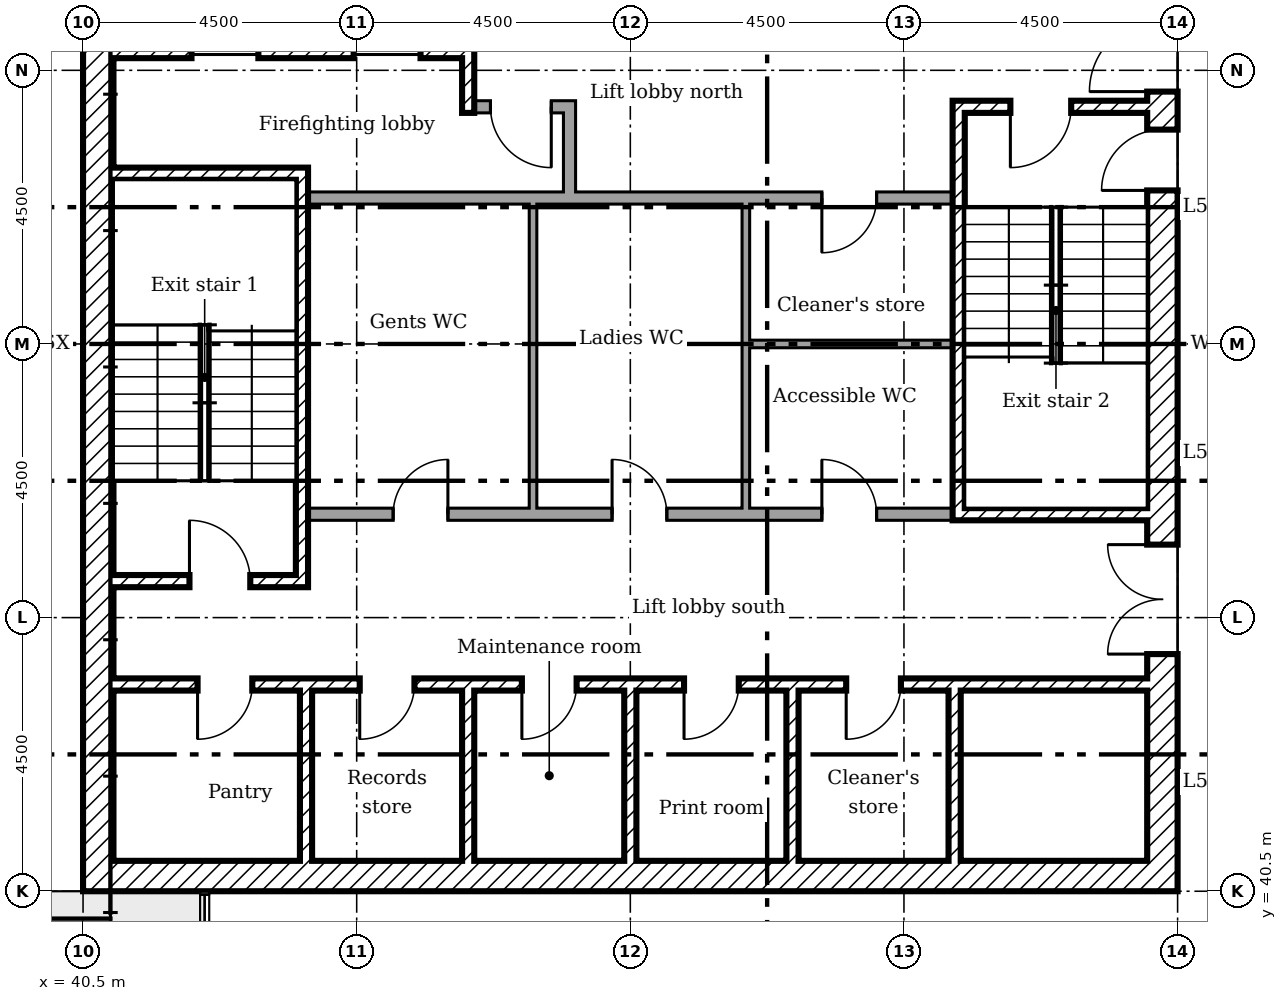
"""IFC4 building model, lengths in metres.
Left out: names, types, materials, properties, quantities, classifications, styles, units other than length and angle.
Written with IfcOpenShell. Run it as: python <this file> out.ifc"""

import sys

from ifc_helpers import new_model, si_unit, direction, frame, frame_2d, origin, place, context, subcontext, project, spatial, rectangle, extrude, element, fill, save


model = new_model("IFC4")
c1 = context("Model", 3, precision=1e-05, world=origin(), true_north=direction((0.0, 1.0)))
c2 = subcontext(c1, "Body", "Model", "MODEL_VIEW")
j1 = project(units=[si_unit("LENGTHUNIT", "METRE"), si_unit("PLANEANGLEUNIT", "RADIAN")], contexts=[c1])
p1 = place(None, origin())
s1 = spatial("IfcSite", under=j1, at=p1, CompositionType="ELEMENT")
p2 = place(p1, origin())
s2 = spatial("IfcBuilding", under=s1, at=p2, CompositionType="ELEMENT")
p3 = place(p2, frame((0.0, 0.0, 206.4)))
s3 = spatial("IfcBuildingStorey", under=s2, at=p3, CompositionType="ELEMENT", Elevation=206.4)
p4 = place(p3, frame((58.25, 40.5, 0.0), z_axis=(0.0, 0.0, 1.0), x_axis=(0.0, 1.0, 0.0)))
e1 = element("IfcWall", 1, at=p4, inside=s3, PredefinedType="SHEAR", context=c2, shape_type="SweptSolid", body=[
    extrude(rectangle(XDim=18.0, YDim=0.5, at=frame_2d((9.0, 0.0))), origin(), (0.0, 0.0, 1.0), 3.35),
])
p5 = place(p4, frame((13.15, 0.0, 0.0)))
e2 = element("IfcOpeningElement", 2, at=p5, cuts=e1, PredefinedType="OPENING", context=c2, shape_type="SweptSolid", body=[
    extrude(rectangle(XDim=1.2, YDim=2.1, at=frame_2d((0.6, 1.05))), frame((0.0, 0.26, 0.0), z_axis=(0.0, -1.0, 0.0), x_axis=(1.0, 0.0, 0.0)), (0.0, 0.0, 1.0), 0.52),
])
p6 = place(p4, frame((3.9, 0.0, 0.0)))
e3 = element("IfcOpeningElement", 3, at=p6, cuts=e1, PredefinedType="OPENING", context=c2, shape_type="SweptSolid", body=[
    extrude(rectangle(XDim=1.8, YDim=2.1, at=frame_2d((0.9, 1.05))), frame((0.0, 0.26, 0.0), z_axis=(0.0, -1.0, 0.0), x_axis=(1.0, 0.0, 0.0)), (0.0, 0.0, 1.0), 0.52),
])
p7 = place(p4, frame((11.525, 0.0, 0.0)))
e4 = element("IfcOpeningElement", 4, at=p7, cuts=e1, PredefinedType="OPENING", context=c2, shape_type="SweptSolid", body=[
    extrude(rectangle(XDim=1.0, YDim=2.1, at=frame_2d((0.5, 1.05))), frame((0.0, 0.26, 0.0), z_axis=(0.0, -1.0, 0.0), x_axis=(1.0, 0.0, 0.0)), (0.0, 0.0, 1.0), 0.52),
])
p8 = place(p3, frame((40.5, 40.75, 0.0)))
e5 = element("IfcWall", 5, at=p8, inside=s3, PredefinedType="SHEAR", context=c2, shape_type="SweptSolid", body=[
    extrude(rectangle(XDim=17.5, YDim=0.5, at=frame_2d((8.75, 0.0))), origin(), (0.0, 0.0, 1.0), 3.35),
])
p9 = place(p3, frame((40.75, 41.0, 0.0), z_axis=(0.0, 0.0, 1.0), x_axis=(0.0, 1.0, 0.0)))
e6 = element("IfcWall", 6, at=p9, inside=s3, PredefinedType="SHEAR", context=c2, shape_type="SweptSolid", body=[
    extrude(rectangle(XDim=17.0, YDim=0.5, at=frame_2d((8.5, 0.0))), origin(), (0.0, 0.0, 1.0), 3.35),
])
p10 = place(p3, frame((46.833, 58.0, 0.0), z_axis=(0.0, 0.0, 1.0), x_axis=(0.0, -1.0, 0.0)))
e7 = element("IfcWall", 7, at=p10, inside=s3, PredefinedType="SHEAR", context=c2, shape_type="SweptSolid", body=[
    extrude(rectangle(XDim=4.7, YDim=0.2, at=frame_2d((2.35, 0.0))), origin(), (0.0, 0.0, 1.0), 3.35),
])
for number, where, z_axis, x_axis in (
    (8, (44.167, 41.0, 0.0), (0.0, 0.0, 1.0), (0.0, 1.0, 0.0)),
    (9, (46.833, 41.0, 0.0), (0.0, 0.0, 1.0), (0.0, 1.0, 0.0)),
    (10, (49.5, 41.0, 0.0), (0.0, 0.0, 1.0), (0.0, 1.0, 0.0)),
    (11, (52.167, 41.0, 0.0), (0.0, 0.0, 1.0), (0.0, 1.0, 0.0)),
    (12, (54.833, 41.0, 0.0), (0.0, 0.0, 1.0), (0.0, 1.0, 0.0)),
):
    element("IfcWall", number, at=place(p3, frame(where, z_axis=z_axis, x_axis=x_axis)), inside=s3, PredefinedType="SHEAR", context=c2, shape_type="SweptSolid", body=[
        extrude(rectangle(XDim=2.8, YDim=0.2, at=frame_2d((1.4, 0.0))), origin(), (0.0, 0.0, 1.0), 3.35),
    ])
p11 = place(p3, frame((48.5, 51.9, 0.0), z_axis=(0.0, 0.0, 1.0), x_axis=(0.0, 1.0, 0.0)))
e13 = element("IfcWall", 13, at=p11, inside=s3, PredefinedType="PARTITIONING", context=c2, shape_type="SweptSolid", body=[
    extrude(rectangle(XDim=1.6, YDim=0.2, at=frame_2d((0.8, 0.0))), origin(), (0.0, 0.0, 1.0), 3.35),
])
p12 = place(p3, frame((46.933, 53.4, 0.0)))
e14 = element("IfcWall", 14, at=p12, inside=s3, PredefinedType="PARTITIONING", context=c2, shape_type="SweptSolid", body=[
    extrude(rectangle(XDim=1.467, YDim=0.2, at=frame_2d((0.733, 0.0))), origin(), (0.0, 0.0, 1.0), 3.35),
])
p13 = place(p12, frame((0.267, 0.0, 0.0)))
e15 = element("IfcOpeningElement", 15, at=p13, cuts=e14, PredefinedType="OPENING", context=c2, shape_type="SweptSolid", body=[
    extrude(rectangle(XDim=1.0, YDim=2.1, at=frame_2d((0.5, 1.05))), frame((0.0, 0.11, 0.0), z_axis=(0.0, -1.0, 0.0), x_axis=(1.0, 0.0, 0.0)), (0.0, 0.0, 1.0), 0.22),
])
p14 = place(p3, frame((41.0, 54.3, 0.0)))
e16 = element("IfcWall", 16, at=p14, inside=s3, PredefinedType="SHEAR", context=c2, shape_type="SweptSolid", body=[
    extrude(rectangle(XDim=5.733, YDim=0.2, at=frame_2d((2.867, 0.0))), origin(), (0.0, 0.0, 1.0), 3.35),
])
p15 = place(p14, frame((1.283, 0.0, 0.0)))
e17 = element("IfcOpeningElement", 17, at=p15, cuts=e16, PredefinedType="OPENING", context=c2, shape_type="SweptSolid", body=[
    extrude(rectangle(XDim=1.1, YDim=2.1, at=frame_2d((0.55, 1.05))), frame((0.0, 0.11, 0.0), z_axis=(0.0, -1.0, 0.0), x_axis=(1.0, 0.0, 0.0)), (0.0, 0.0, 1.0), 0.22),
])
p16 = place(p14, frame((3.95, 0.0, 0.0)))
e18 = element("IfcOpeningElement", 18, at=p16, cuts=e16, PredefinedType="OPENING", context=c2, shape_type="SweptSolid", body=[
    extrude(rectangle(XDim=1.1, YDim=2.1, at=frame_2d((0.55, 1.05))), frame((0.0, 0.11, 0.0), z_axis=(0.0, -1.0, 0.0), x_axis=(1.0, 0.0, 0.0)), (0.0, 0.0, 1.0), 0.22),
])
p17 = place(p3, frame((41.0, 43.9, 0.0)))
e19 = element("IfcWall", 19, at=p17, inside=s3, PredefinedType="SHEAR", context=c2, shape_type="SweptSolid", body=[
    extrude(rectangle(XDim=17.0, YDim=0.2, at=frame_2d((8.5, 0.0))), origin(), (0.0, 0.0, 1.0), 3.35),
])
p18 = place(p17, frame((1.383, 0.0, 0.0)))
e20 = element("IfcOpeningElement", 20, at=p18, cuts=e19, PredefinedType="OPENING", context=c2, shape_type="SweptSolid", body=[
    extrude(rectangle(XDim=0.9, YDim=2.1, at=frame_2d((0.45, 1.05))), frame((0.0, 0.11, 0.0), z_axis=(0.0, -1.0, 0.0), x_axis=(1.0, 0.0, 0.0)), (0.0, 0.0, 1.0), 0.22),
])
p19 = place(p17, frame((4.05, 0.0, 0.0)))
e21 = element("IfcOpeningElement", 21, at=p19, cuts=e19, PredefinedType="OPENING", context=c2, shape_type="SweptSolid", body=[
    extrude(rectangle(XDim=0.9, YDim=2.1, at=frame_2d((0.45, 1.05))), frame((0.0, 0.11, 0.0), z_axis=(0.0, -1.0, 0.0), x_axis=(1.0, 0.0, 0.0)), (0.0, 0.0, 1.0), 0.22),
])
p20 = place(p17, frame((6.717, 0.0, 0.0)))
e22 = element("IfcOpeningElement", 22, at=p20, cuts=e19, PredefinedType="OPENING", context=c2, shape_type="SweptSolid", body=[
    extrude(rectangle(XDim=0.9, YDim=2.1, at=frame_2d((0.45, 1.05))), frame((0.0, 0.11, 0.0), z_axis=(0.0, -1.0, 0.0), x_axis=(1.0, 0.0, 0.0)), (0.0, 0.0, 1.0), 0.22),
])
p21 = place(p17, frame((9.383, 0.0, 0.0)))
e23 = element("IfcOpeningElement", 23, at=p21, cuts=e19, PredefinedType="OPENING", context=c2, shape_type="SweptSolid", body=[
    extrude(rectangle(XDim=0.9, YDim=2.1, at=frame_2d((0.45, 1.05))), frame((0.0, 0.11, 0.0), z_axis=(0.0, -1.0, 0.0), x_axis=(1.0, 0.0, 0.0)), (0.0, 0.0, 1.0), 0.22),
])
p22 = place(p17, frame((12.05, 0.0, 0.0)))
e24 = element("IfcOpeningElement", 24, at=p22, cuts=e19, PredefinedType="OPENING", context=c2, shape_type="SweptSolid", body=[
    extrude(rectangle(XDim=0.9, YDim=2.1, at=frame_2d((0.45, 1.05))), frame((0.0, 0.11, 0.0), z_axis=(0.0, -1.0, 0.0), x_axis=(1.0, 0.0, 0.0)), (0.0, 0.0, 1.0), 0.22),
])
p23 = place(p3, frame((44.1, 45.5, 0.0), z_axis=(0.0, 0.0, 1.0), x_axis=(0.0, 1.0, 0.0)))
e25 = element("IfcWall", 25, at=p23, inside=s3, PredefinedType="SHEAR", context=c2, shape_type="SweptSolid", body=[
    extrude(rectangle(XDim=6.9, YDim=0.2, at=frame_2d((3.45, 0.0))), origin(), (0.0, 0.0, 1.0), 3.35),
])
p24 = place(p3, frame((41.0, 52.3, 0.0)))
e26 = element("IfcWall", 26, at=p24, inside=s3, PredefinedType="SHEAR", context=c2, shape_type="SweptSolid", body=[
    extrude(rectangle(XDim=3.0, YDim=0.2, at=frame_2d((1.5, 0.0))), origin(), (0.0, 0.0, 1.0), 3.35),
])
p25 = place(p3, frame((41.0, 45.6, 0.0)))
e27 = element("IfcWall", 27, at=p25, inside=s3, PredefinedType="SHEAR", context=c2, shape_type="SweptSolid", body=[
    extrude(rectangle(XDim=3.0, YDim=0.2, at=frame_2d((1.5, 0.0))), origin(), (0.0, 0.0, 1.0), 3.35),
])
p26 = place(p25, frame((1.25, 0.0, 0.0)))
e28 = element("IfcOpeningElement", 28, at=p26, cuts=e27, PredefinedType="OPENING", context=c2, shape_type="SweptSolid", body=[
    extrude(rectangle(XDim=1.0, YDim=2.1, at=frame_2d((0.5, 1.05))), frame((0.0, 0.11, 0.0), z_axis=(0.0, -1.0, 0.0), x_axis=(1.0, 0.0, 0.0)), (0.0, 0.0, 1.0), 0.22),
])
p27 = place(p3, frame((54.8, 53.4, 0.0)))
e29 = element("IfcWall", 29, at=p27, inside=s3, PredefinedType="SHEAR", context=c2, shape_type="SweptSolid", body=[
    extrude(rectangle(XDim=3.2, YDim=0.2, at=frame_2d((1.6, 0.0))), origin(), (0.0, 0.0, 1.0), 3.35),
])
p28 = place(p27, frame((0.95, 0.0, 0.0)))
e30 = element("IfcOpeningElement", 30, at=p28, cuts=e29, PredefinedType="OPENING", context=c2, shape_type="SweptSolid", body=[
    extrude(rectangle(XDim=1.0, YDim=2.1, at=frame_2d((0.5, 1.05))), frame((0.0, 0.11, 0.0), z_axis=(0.0, -1.0, 0.0), x_axis=(1.0, 0.0, 0.0)), (0.0, 0.0, 1.0), 0.22),
])
p29 = place(p3, frame((54.8, 46.7, 0.0)))
e31 = element("IfcWall", 31, at=p29, inside=s3, PredefinedType="SHEAR", context=c2, shape_type="SweptSolid", body=[
    extrude(rectangle(XDim=3.2, YDim=0.2, at=frame_2d((1.6, 0.0))), origin(), (0.0, 0.0, 1.0), 3.35),
])
p30 = place(p3, frame((54.9, 46.8, 0.0), z_axis=(0.0, 0.0, 1.0), x_axis=(0.0, 1.0, 0.0)))
e32 = element("IfcWall", 32, at=p30, inside=s3, PredefinedType="SHEAR", context=c2, shape_type="SweptSolid", body=[
    extrude(rectangle(XDim=6.5, YDim=0.2, at=frame_2d((3.25, 0.0))), origin(), (0.0, 0.0, 1.0), 3.35),
])
p31 = place(p3, frame((44.2, 51.9, 0.0)))
e33 = element("IfcWall", 33, at=p31, inside=s3, PredefinedType="PARTITIONING", context=c2, shape_type="SweptSolid", body=[
    extrude(rectangle(XDim=10.6, YDim=0.2, at=frame_2d((5.3, 0.0))), origin(), (0.0, 0.0, 1.0), 3.35),
])
p32 = place(p31, frame((8.45, 0.0, 0.0)))
e34 = element("IfcOpeningElement", 34, at=p32, cuts=e33, PredefinedType="OPENING", context=c2, shape_type="SweptSolid", body=[
    extrude(rectangle(XDim=0.9, YDim=2.1, at=frame_2d((0.45, 1.05))), frame((0.0, 0.11, 0.0), z_axis=(0.0, -1.0, 0.0), x_axis=(1.0, 0.0, 0.0)), (0.0, 0.0, 1.0), 0.22),
])
p33 = place(p3, frame((44.2, 46.7, 0.0)))
e35 = element("IfcWall", 35, at=p33, inside=s3, PredefinedType="PARTITIONING", context=c2, shape_type="SweptSolid", body=[
    extrude(rectangle(XDim=10.6, YDim=0.2, at=frame_2d((5.3, 0.0))), origin(), (0.0, 0.0, 1.0), 3.35),
])
p34 = place(p33, frame((1.4, 0.0, 0.0)))
e36 = element("IfcOpeningElement", 36, at=p34, cuts=e35, PredefinedType="OPENING", context=c2, shape_type="SweptSolid", body=[
    extrude(rectangle(XDim=0.9, YDim=2.1, at=frame_2d((0.45, 1.05))), frame((0.0, 0.11, 0.0), z_axis=(0.0, -1.0, 0.0), x_axis=(1.0, 0.0, 0.0)), (0.0, 0.0, 1.0), 0.22),
])
p35 = place(p33, frame((5.0, 0.0, 0.0)))
e37 = element("IfcOpeningElement", 37, at=p35, cuts=e35, PredefinedType="OPENING", context=c2, shape_type="SweptSolid", body=[
    extrude(rectangle(XDim=0.9, YDim=2.1, at=frame_2d((0.45, 1.05))), frame((0.0, 0.11, 0.0), z_axis=(0.0, -1.0, 0.0), x_axis=(1.0, 0.0, 0.0)), (0.0, 0.0, 1.0), 0.22),
])
p36 = place(p33, frame((8.45, 0.0, 0.0)))
e38 = element("IfcOpeningElement", 38, at=p36, cuts=e35, PredefinedType="OPENING", context=c2, shape_type="SweptSolid", body=[
    extrude(rectangle(XDim=0.9, YDim=2.1, at=frame_2d((0.45, 1.05))), frame((0.0, 0.11, 0.0), z_axis=(0.0, -1.0, 0.0), x_axis=(1.0, 0.0, 0.0)), (0.0, 0.0, 1.0), 0.22),
])
p37 = place(p3, frame((47.9, 46.8, 0.0), z_axis=(0.0, 0.0, 1.0), x_axis=(0.0, 1.0, 0.0)))
e39 = element("IfcWall", 39, at=p37, inside=s3, PredefinedType="PARTITIONING", context=c2, shape_type="SweptSolid", body=[
    extrude(rectangle(XDim=5.0, YDim=0.125, at=frame_2d((2.5, 0.0))), origin(), (0.0, 0.0, 1.0), 3.35),
])
p38 = place(p3, frame((51.4, 46.8, 0.0), z_axis=(0.0, 0.0, 1.0), x_axis=(0.0, 1.0, 0.0)))
e40 = element("IfcWall", 40, at=p38, inside=s3, PredefinedType="PARTITIONING", context=c2, shape_type="SweptSolid", body=[
    extrude(rectangle(XDim=2.762, YDim=0.125, at=frame_2d((1.381, 0.0))), origin(), (0.0, 0.0, 1.0), 3.35),
])
p39 = place(p3, frame((54.8, 49.5, 0.0), z_axis=(0.0, 0.0, 1.0), x_axis=(-1.0, 0.0, 0.0)))
e41 = element("IfcWall", 41, at=p39, inside=s3, PredefinedType="PARTITIONING", context=c2, shape_type="SweptSolid", body=[
    extrude(rectangle(XDim=3.338, YDim=0.125, at=frame_2d((1.669, 0.0))), origin(), (0.0, 0.0, 1.0), 3.35),
])
p40 = place(p3, frame((51.4, 49.5, 0.0), z_axis=(0.0, 0.0, 1.0), x_axis=(0.0, 1.0, 0.0)))
e42 = element("IfcWall", 42, at=p40, inside=s3, PredefinedType="PARTITIONING", context=c2, shape_type="SweptSolid", body=[
    extrude(rectangle(XDim=2.3, YDim=0.125, at=frame_2d((1.15, 0.0))), origin(), (0.0, 0.0, 1.0), 3.35),
])
p41 = place(p5, origin())
e43 = element("IfcDoor", 43, at=p41, inside=s3, OperationType="SINGLE_SWING_RIGHT", PredefinedType="DOOR", context=c2, shape_type="SweptSolid", body=[
    extrude(rectangle(XDim=1.2, YDim=2.1, at=frame_2d((0.6, 1.05))), frame((0.0, 0.025, 0.0), z_axis=(0.0, -1.0, 0.0), x_axis=(1.0, 0.0, 0.0)), (0.0, 0.0, 1.0), 0.05),
])
fill(e2, e43)
p42 = place(p6, origin())
e44 = element("IfcDoor", 44, at=p42, inside=s3, OperationType="DOUBLE_DOOR_SINGLE_SWING", PredefinedType="DOOR", context=c2, shape_type="SweptSolid", body=[
    extrude(rectangle(XDim=1.8, YDim=2.1, at=frame_2d((0.9, 1.05))), frame((0.0, 0.025, 0.0), z_axis=(0.0, -1.0, 0.0), x_axis=(1.0, 0.0, 0.0)), (0.0, 0.0, 1.0), 0.05),
])
fill(e3, e44)
p43 = place(p26, origin())
e45 = element("IfcDoor", 45, at=p43, inside=s3, OperationType="SINGLE_SWING_RIGHT", PredefinedType="DOOR", context=c2, shape_type="SweptSolid", body=[
    extrude(rectangle(XDim=1.0, YDim=2.1, at=frame_2d((0.5, 1.05))), frame((0.0, 0.025, 0.0), z_axis=(0.0, -1.0, 0.0), x_axis=(1.0, 0.0, 0.0)), (0.0, 0.0, 1.0), 0.05),
])
fill(e28, e45)
p44 = place(p28, frame((1.0, 0.0, 0.0), x_axis=(-1.0, 0.0, 0.0)))
e46 = element("IfcDoor", 46, at=p44, inside=s3, OperationType="SINGLE_SWING_LEFT", PredefinedType="DOOR", context=c2, shape_type="SweptSolid", body=[
    extrude(rectangle(XDim=1.0, YDim=2.1, at=frame_2d((0.5, 1.05))), frame((0.0, 0.025, 0.0), z_axis=(0.0, -1.0, 0.0), x_axis=(1.0, 0.0, 0.0)), (0.0, 0.0, 1.0), 0.05),
])
fill(e30, e46)
p45 = place(p7, origin())
e47 = element("IfcDoor", 47, at=p45, inside=s3, OperationType="SINGLE_SWING_RIGHT", PredefinedType="DOOR", context=c2, shape_type="SweptSolid", body=[
    extrude(rectangle(XDim=1.0, YDim=2.1, at=frame_2d((0.5, 1.05))), frame((0.0, 0.025, 0.0), z_axis=(0.0, -1.0, 0.0), x_axis=(1.0, 0.0, 0.0)), (0.0, 0.0, 1.0), 0.05),
])
fill(e4, e47)
p46 = place(p13, frame((1.0, 0.0, 0.0), x_axis=(-1.0, 0.0, 0.0)))
e48 = element("IfcDoor", 48, at=p46, inside=s3, OperationType="SINGLE_SWING_RIGHT", PredefinedType="DOOR", context=c2, shape_type="SweptSolid", body=[
    extrude(rectangle(XDim=1.0, YDim=2.1, at=frame_2d((0.5, 1.05))), frame((0.0, 0.025, 0.0), z_axis=(0.0, -1.0, 0.0), x_axis=(1.0, 0.0, 0.0)), (0.0, 0.0, 1.0), 0.05),
])
fill(e15, e48)
p47 = place(p18, frame((0.9, 0.0, 0.0), x_axis=(-1.0, 0.0, 0.0)))
e49 = element("IfcDoor", 49, at=p47, inside=s3, OperationType="SINGLE_SWING_LEFT", PredefinedType="DOOR", context=c2, shape_type="SweptSolid", body=[
    extrude(rectangle(XDim=0.9, YDim=2.1, at=frame_2d((0.45, 1.05))), frame((0.0, 0.025, 0.0), z_axis=(0.0, -1.0, 0.0), x_axis=(1.0, 0.0, 0.0)), (0.0, 0.0, 1.0), 0.05),
])
fill(e20, e49)
p48 = place(p19, frame((0.9, 0.0, 0.0), x_axis=(-1.0, 0.0, 0.0)))
e50 = element("IfcDoor", 50, at=p48, inside=s3, OperationType="SINGLE_SWING_LEFT", PredefinedType="DOOR", context=c2, shape_type="SweptSolid", body=[
    extrude(rectangle(XDim=0.9, YDim=2.1, at=frame_2d((0.45, 1.05))), frame((0.0, 0.025, 0.0), z_axis=(0.0, -1.0, 0.0), x_axis=(1.0, 0.0, 0.0)), (0.0, 0.0, 1.0), 0.05),
])
fill(e21, e50)
p49 = place(p20, frame((0.9, 0.0, 0.0), x_axis=(-1.0, 0.0, 0.0)))
e51 = element("IfcDoor", 51, at=p49, inside=s3, OperationType="SINGLE_SWING_LEFT", PredefinedType="DOOR", context=c2, shape_type="SweptSolid", body=[
    extrude(rectangle(XDim=0.9, YDim=2.1, at=frame_2d((0.45, 1.05))), frame((0.0, 0.025, 0.0), z_axis=(0.0, -1.0, 0.0), x_axis=(1.0, 0.0, 0.0)), (0.0, 0.0, 1.0), 0.05),
])
fill(e22, e51)
p50 = place(p21, frame((0.9, 0.0, 0.0), x_axis=(-1.0, 0.0, 0.0)))
e52 = element("IfcDoor", 52, at=p50, inside=s3, OperationType="SINGLE_SWING_LEFT", PredefinedType="DOOR", context=c2, shape_type="SweptSolid", body=[
    extrude(rectangle(XDim=0.9, YDim=2.1, at=frame_2d((0.45, 1.05))), frame((0.0, 0.025, 0.0), z_axis=(0.0, -1.0, 0.0), x_axis=(1.0, 0.0, 0.0)), (0.0, 0.0, 1.0), 0.05),
])
fill(e23, e52)
p51 = place(p22, frame((0.9, 0.0, 0.0), x_axis=(-1.0, 0.0, 0.0)))
e53 = element("IfcDoor", 53, at=p51, inside=s3, OperationType="SINGLE_SWING_LEFT", PredefinedType="DOOR", context=c2, shape_type="SweptSolid", body=[
    extrude(rectangle(XDim=0.9, YDim=2.1, at=frame_2d((0.45, 1.05))), frame((0.0, 0.025, 0.0), z_axis=(0.0, -1.0, 0.0), x_axis=(1.0, 0.0, 0.0)), (0.0, 0.0, 1.0), 0.05),
])
fill(e24, e53)
p52 = place(p34, origin())
e54 = element("IfcDoor", 54, at=p52, inside=s3, OperationType="SINGLE_SWING_LEFT", PredefinedType="DOOR", context=c2, shape_type="SweptSolid", body=[
    extrude(rectangle(XDim=0.9, YDim=2.1, at=frame_2d((0.45, 1.05))), frame((0.0, 0.025, 0.0), z_axis=(0.0, -1.0, 0.0), x_axis=(1.0, 0.0, 0.0)), (0.0, 0.0, 1.0), 0.05),
])
fill(e36, e54)
p53 = place(p35, origin())
e55 = element("IfcDoor", 55, at=p53, inside=s3, OperationType="SINGLE_SWING_RIGHT", PredefinedType="DOOR", context=c2, shape_type="SweptSolid", body=[
    extrude(rectangle(XDim=0.9, YDim=2.1, at=frame_2d((0.45, 1.05))), frame((0.0, 0.025, 0.0), z_axis=(0.0, -1.0, 0.0), x_axis=(1.0, 0.0, 0.0)), (0.0, 0.0, 1.0), 0.05),
])
fill(e37, e55)
p54 = place(p36, origin())
e56 = element("IfcDoor", 56, at=p54, inside=s3, OperationType="SINGLE_SWING_RIGHT", PredefinedType="DOOR", context=c2, shape_type="SweptSolid", body=[
    extrude(rectangle(XDim=0.9, YDim=2.1, at=frame_2d((0.45, 1.05))), frame((0.0, 0.025, 0.0), z_axis=(0.0, -1.0, 0.0), x_axis=(1.0, 0.0, 0.0)), (0.0, 0.0, 1.0), 0.05),
])
fill(e38, e56)
p55 = place(p32, frame((0.9, 0.0, 0.0), x_axis=(-1.0, 0.0, 0.0)))
e57 = element("IfcDoor", 57, at=p55, inside=s3, OperationType="SINGLE_SWING_LEFT", PredefinedType="DOOR", context=c2, shape_type="SweptSolid", body=[
    extrude(rectangle(XDim=0.9, YDim=2.1, at=frame_2d((0.45, 1.05))), frame((0.0, 0.025, 0.0), z_axis=(0.0, -1.0, 0.0), x_axis=(1.0, 0.0, 0.0)), (0.0, 0.0, 1.0), 0.05),
])
fill(e34, e57)
p56 = place(p15, origin())
e58 = element("IfcDoor", 58, at=p56, inside=s3, OperationType="SLIDING_TO_LEFT", PredefinedType="DOOR", context=c2, shape_type="SweptSolid", body=[
    extrude(rectangle(XDim=1.1, YDim=2.1, at=frame_2d((0.55, 1.05))), frame((0.0, 0.025, 0.0), z_axis=(0.0, -1.0, 0.0), x_axis=(1.0, 0.0, 0.0)), (0.0, 0.0, 1.0), 0.05),
])
fill(e17, e58)
p57 = place(p16, origin())
e59 = element("IfcDoor", 59, at=p57, inside=s3, OperationType="SLIDING_TO_LEFT", PredefinedType="DOOR", context=c2, shape_type="SweptSolid", body=[
    extrude(rectangle(XDim=1.1, YDim=2.1, at=frame_2d((0.55, 1.05))), frame((0.0, 0.025, 0.0), z_axis=(0.0, -1.0, 0.0), x_axis=(1.0, 0.0, 0.0)), (0.0, 0.0, 1.0), 0.05),
])
fill(e18, e59)
save(model, sys.argv[1])
